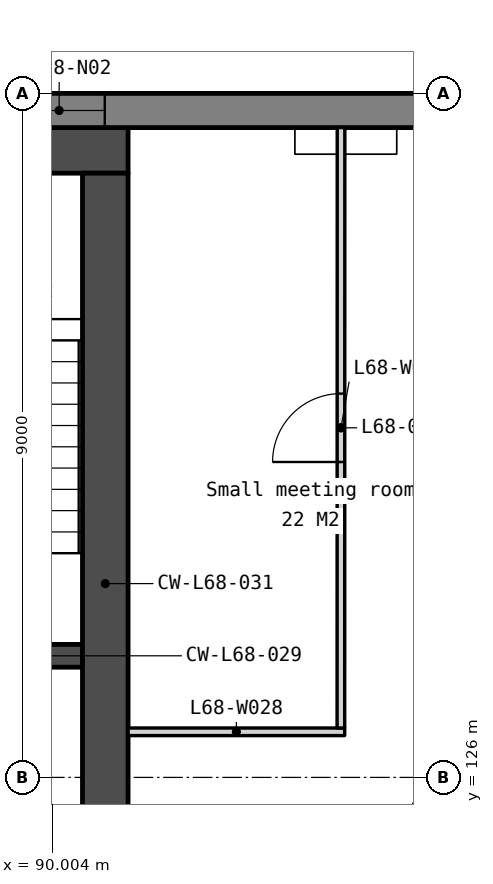
"""IFC4 building model, lengths in metres.
Left out: names, types, materials, properties, quantities, classifications, styles, units other than length and angle.
Written with IfcOpenShell. Run it as: python <this file> out.ifc"""

import sys

from ifc_helpers import new_model, si_unit, direction, frame, frame_2d, origin, place, context, subcontext, project, spatial, polyline, rectangle, outline, extrude, element, fill, save


model = new_model("IFC4")
c1 = context("Model", 3, precision=1e-05, world=origin(), true_north=direction((0.0, 1.0)))
c2 = subcontext(c1, "Body", "Model", "MODEL_VIEW")
j1 = project(units=[si_unit("LENGTHUNIT", "METRE"), si_unit("PLANEANGLEUNIT", "RADIAN")], contexts=[c1])
p1 = place(None, origin())
s1 = spatial("IfcSite", under=j1, at=p1, CompositionType="ELEMENT")
p2 = place(p1, origin())
s2 = spatial("IfcBuilding", under=s1, at=p2, CompositionType="ELEMENT")
p3 = place(p2, frame((0.0, 0.0, 277.7)))
s3 = spatial("IfcBuildingStorey", under=s2, at=p3, CompositionType="ELEMENT", Elevation=277.7)
p4 = place(p3, frame((69.0, 134.25, 0.0), z_axis=(0.0, 0.0, 1.0), x_axis=(1.0, 0.0, 0.0)))
e1 = element("IfcWall", 1, at=p4, inside=s3, PredefinedType="SOLIDWALL", context=c2, shape_type="SweptSolid", body=[
    extrude(rectangle(XDim=22.0, YDim=0.6, at=frame_2d((11.0, 0.0))), origin(), (0.0, 0.0, 1.0), 3.75),
])
p5 = place(p3, frame((87.85, 127.6, 0.0), z_axis=(0.0, 0.0, 1.0), x_axis=(1.0, 0.0, 0.0)))
e2 = element("IfcWall", 2, at=p5, inside=s3, PredefinedType="SOLIDWALL", context=c2, shape_type="SweptSolid", body=[
    extrude(rectangle(XDim=2.55, YDim=0.3, at=frame_2d((1.275, 0.0))), origin(), (0.0, 0.0, 1.0), 3.75),
])
p6 = place(p3, frame((90.7, 133.95, 0.0), z_axis=(0.0, 0.0, 1.0), x_axis=(0.0, -1.0, 0.0)))
e3 = element("IfcWall", 3, at=p6, inside=s3, PredefinedType="SOLIDWALL", context=c2, shape_type="SweptSolid", body=[
    extrude(rectangle(XDim=10.8, YDim=0.6, at=frame_2d((5.4, 0.0))), origin(), (0.0, 0.0, 1.0), 3.75),
])
p7 = place(p3, frame((98.486, 134.775, -0.15), z_axis=(0.0, 0.0, 1.0), x_axis=(-1.0, 0.0, 0.0)))
e4 = element("IfcWall", 4, at=p7, inside=s3, PredefinedType="SOLIDWALL", context=c2, shape_type="SweptSolid", body=[
    extrude(outline(polyline([(36.972, 0.0), (36.972, 3.9), (0.0, 3.9), (0.0, 0.0), (36.972, 0.0)])), frame((0.0, 0.225, 0.0), z_axis=(0.0, -1.0, 0.0), x_axis=(1.0, 0.0, 0.0)), (0.0, 0.0, 1.0), 0.45),
])
p8 = place(p7, frame((0.744, 0.0, 0.95)))
e5 = element("IfcOpeningElement", 5, at=p8, cuts=e4, PredefinedType="OPENING", context=c2, shape_type="SweptSolid", body=[
    extrude(rectangle(XDim=1.2, YDim=2.2, at=frame_2d((0.6, 1.1))), frame((0.0, 0.235, 0.0), z_axis=(0.0, -1.0, 0.0), x_axis=(1.0, 0.0, 0.0)), (0.0, 0.0, 1.0), 0.47),
])
p9 = place(p7, frame((7.793, 0.0, 0.95)))
e6 = element("IfcOpeningElement", 6, at=p9, cuts=e4, PredefinedType="OPENING", context=c2, shape_type="SweptSolid", body=[
    extrude(rectangle(XDim=1.2, YDim=2.2, at=frame_2d((0.6, 1.1))), frame((0.0, 0.235, 0.0), z_axis=(0.0, -1.0, 0.0), x_axis=(1.0, 0.0, 0.0)), (0.0, 0.0, 1.0), 0.47),
])
p10 = place(p7, frame((9.493, 0.0, 0.95)))
e7 = element("IfcOpeningElement", 7, at=p10, cuts=e4, PredefinedType="OPENING", context=c2, shape_type="SweptSolid", body=[
    extrude(rectangle(XDim=1.2, YDim=2.2, at=frame_2d((0.6, 1.1))), frame((0.0, 0.235, 0.0), z_axis=(0.0, -1.0, 0.0), x_axis=(1.0, 0.0, 0.0)), (0.0, 0.0, 1.0), 0.47),
])
p11 = place(p7, frame((17.036, 0.0, 0.95)))
e8 = element("IfcOpeningElement", 8, at=p11, cuts=e4, PredefinedType="OPENING", context=c2, shape_type="SweptSolid", body=[
    extrude(rectangle(XDim=1.2, YDim=2.2, at=frame_2d((0.6, 1.1))), frame((0.0, 0.235, 0.0), z_axis=(0.0, -1.0, 0.0), x_axis=(1.0, 0.0, 0.0)), (0.0, 0.0, 1.0), 0.47),
])
p12 = place(p7, frame((18.736, 0.0, 0.95)))
e9 = element("IfcOpeningElement", 9, at=p12, cuts=e4, PredefinedType="OPENING", context=c2, shape_type="SweptSolid", body=[
    extrude(rectangle(XDim=1.2, YDim=2.2, at=frame_2d((0.6, 1.1))), frame((0.0, 0.235, 0.0), z_axis=(0.0, -1.0, 0.0), x_axis=(1.0, 0.0, 0.0)), (0.0, 0.0, 1.0), 0.47),
])
p13 = place(p7, frame((26.279, 0.0, 0.95)))
e10 = element("IfcOpeningElement", 10, at=p13, cuts=e4, PredefinedType="OPENING", context=c2, shape_type="SweptSolid", body=[
    extrude(rectangle(XDim=1.2, YDim=2.2, at=frame_2d((0.6, 1.1))), frame((0.0, 0.235, 0.0), z_axis=(0.0, -1.0, 0.0), x_axis=(1.0, 0.0, 0.0)), (0.0, 0.0, 1.0), 0.47),
])
p14 = place(p7, frame((27.979, 0.0, 0.95)))
e11 = element("IfcOpeningElement", 11, at=p14, cuts=e4, PredefinedType="OPENING", context=c2, shape_type="SweptSolid", body=[
    extrude(rectangle(XDim=1.2, YDim=2.2, at=frame_2d((0.6, 1.1))), frame((0.0, 0.235, 0.0), z_axis=(0.0, -1.0, 0.0), x_axis=(1.0, 0.0, 0.0)), (0.0, 0.0, 1.0), 0.47),
])
p15 = place(p7, frame((35.028, 0.0, 0.95)))
e12 = element("IfcOpeningElement", 12, at=p15, cuts=e4, PredefinedType="OPENING", context=c2, shape_type="SweptSolid", body=[
    extrude(rectangle(XDim=1.2, YDim=2.2, at=frame_2d((0.6, 1.1))), frame((0.0, 0.235, 0.0), z_axis=(0.0, -1.0, 0.0), x_axis=(1.0, 0.0, 0.0)), (0.0, 0.0, 1.0), 0.47),
])
p16 = place(p3, frame((86.427, 110.752, -0.15), z_axis=(0.0, 0.0, 1.0), x_axis=(0.500000383388, 0.866025182435, 0.0)))
e13 = element("IfcWall", 13, at=p16, inside=s3, PredefinedType="SOLIDWALL", context=c2, shape_type="SweptSolid", body=[
    extrude(outline(polyline([(25.929, 3.9), (25.929, 0.0), (0.0, 0.0), (0.0, 3.9), (25.929, 3.9)])), frame((0.0, 0.225, 0.0), z_axis=(0.0, -1.0, 0.0), x_axis=(1.0, 0.0, 0.0)), (0.0, 0.0, 1.0), 0.45),
])
p17 = place(p16, frame((5.993, 0.0, 0.95)))
e14 = element("IfcOpeningElement", 14, at=p17, cuts=e13, PredefinedType="OPENING", context=c2, shape_type="SweptSolid", body=[
    extrude(rectangle(XDim=1.2, YDim=2.2, at=frame_2d((0.6, 1.1))), frame((0.0, 0.235, 0.0), z_axis=(0.0, -1.0, 0.0), x_axis=(1.0, 0.0, 0.0)), (0.0, 0.0, 1.0), 0.47),
])
p18 = place(p16, frame((7.693, 0.0, 0.95)))
e15 = element("IfcOpeningElement", 15, at=p18, cuts=e13, PredefinedType="OPENING", context=c2, shape_type="SweptSolid", body=[
    extrude(rectangle(XDim=1.2, YDim=2.2, at=frame_2d((0.6, 1.1))), frame((0.0, 0.235, 0.0), z_axis=(0.0, -1.0, 0.0), x_axis=(1.0, 0.0, 0.0)), (0.0, 0.0, 1.0), 0.47),
])
p19 = place(p16, frame((15.236, 0.0, 0.95)))
e16 = element("IfcOpeningElement", 16, at=p19, cuts=e13, PredefinedType="OPENING", context=c2, shape_type="SweptSolid", body=[
    extrude(rectangle(XDim=1.2, YDim=2.2, at=frame_2d((0.6, 1.1))), frame((0.0, 0.235, 0.0), z_axis=(0.0, -1.0, 0.0), x_axis=(1.0, 0.0, 0.0)), (0.0, 0.0, 1.0), 0.47),
])
p20 = place(p16, frame((16.936, 0.0, 0.95)))
e17 = element("IfcOpeningElement", 17, at=p20, cuts=e13, PredefinedType="OPENING", context=c2, shape_type="SweptSolid", body=[
    extrude(rectangle(XDim=1.2, YDim=2.2, at=frame_2d((0.6, 1.1))), frame((0.0, 0.235, 0.0), z_axis=(0.0, -1.0, 0.0), x_axis=(1.0, 0.0, 0.0)), (0.0, 0.0, 1.0), 0.47),
])
p21 = place(p16, frame((23.985, 0.0, 0.95)))
e18 = element("IfcOpeningElement", 18, at=p21, cuts=e13, PredefinedType="OPENING", context=c2, shape_type="SweptSolid", body=[
    extrude(rectangle(XDim=1.2, YDim=2.2, at=frame_2d((0.6, 1.1))), frame((0.0, 0.235, 0.0), z_axis=(0.0, -1.0, 0.0), x_axis=(1.0, 0.0, 0.0)), (0.0, 0.0, 1.0), 0.47),
])
p22 = place(p3, frame((91.0, 126.6, 0.0), z_axis=(0.0, 0.0, 1.0), x_axis=(1.0, 0.0, 0.0)))
e19 = element("IfcWall", 19, at=p22, inside=s3, PredefinedType="PARTITIONING", context=c2, shape_type="SweptSolid", body=[
    extrude(rectangle(XDim=2.85, YDim=0.1, at=frame_2d((1.425, 0.0))), origin(), (0.0, 0.0, 1.0), 3.75),
])
p23 = place(p3, frame((93.8, 126.65, 0.0), z_axis=(0.0, 0.0, 1.0), x_axis=(0.000247226421, 0.99999996944, 0.0)))
e20 = element("IfcWall", 20, at=p23, inside=s3, PredefinedType="PARTITIONING", context=c2, shape_type="SweptSolid", body=[
    extrude(rectangle(XDim=7.9, YDim=0.1, at=frame_2d((3.95, 0.0))), origin(), (0.0, 0.0, 1.0), 3.75),
])
p24 = place(p23, frame((3.5, 0.0, 0.0)))
e21 = element("IfcOpeningElement", 21, at=p24, cuts=e20, PredefinedType="OPENING", context=c2, shape_type="SweptSolid", body=[
    extrude(rectangle(XDim=0.9, YDim=2.1, at=frame_2d((0.45, 1.05))), frame((0.0, 0.06, 0.0), z_axis=(0.0, -1.0, 0.0), x_axis=(1.0, 0.0, 0.0)), (0.0, 0.0, 1.0), 0.12),
])
p25 = place(p9, origin())
e22 = element("IfcWindow", 22, at=p25, inside=s3, PartitioningType="SINGLE_PANEL", PredefinedType="WINDOW", context=c2, shape_type="SweptSolid", body=[
    extrude(rectangle(XDim=1.2, YDim=2.2, at=frame_2d((0.6, 1.1))), frame((0.0, 0.03, 0.0), z_axis=(0.0, -1.0, 0.0), x_axis=(1.0, 0.0, 0.0)), (0.0, 0.0, 1.0), 0.06),
])
fill(e6, e22)
p26 = place(p24, origin())
e23 = element("IfcDoor", 23, at=p26, inside=s3, OperationType="SINGLE_SWING_LEFT", PredefinedType="DOOR", context=c2, shape_type="SweptSolid", body=[
    extrude(rectangle(XDim=0.9, YDim=2.1, at=frame_2d((0.45, 1.05))), frame((0.0, 0.025, 0.0), z_axis=(0.0, -1.0, 0.0), x_axis=(1.0, 0.0, 0.0)), (0.0, 0.0, 1.0), 0.05),
])
fill(e21, e23)
save(model, sys.argv[1])
